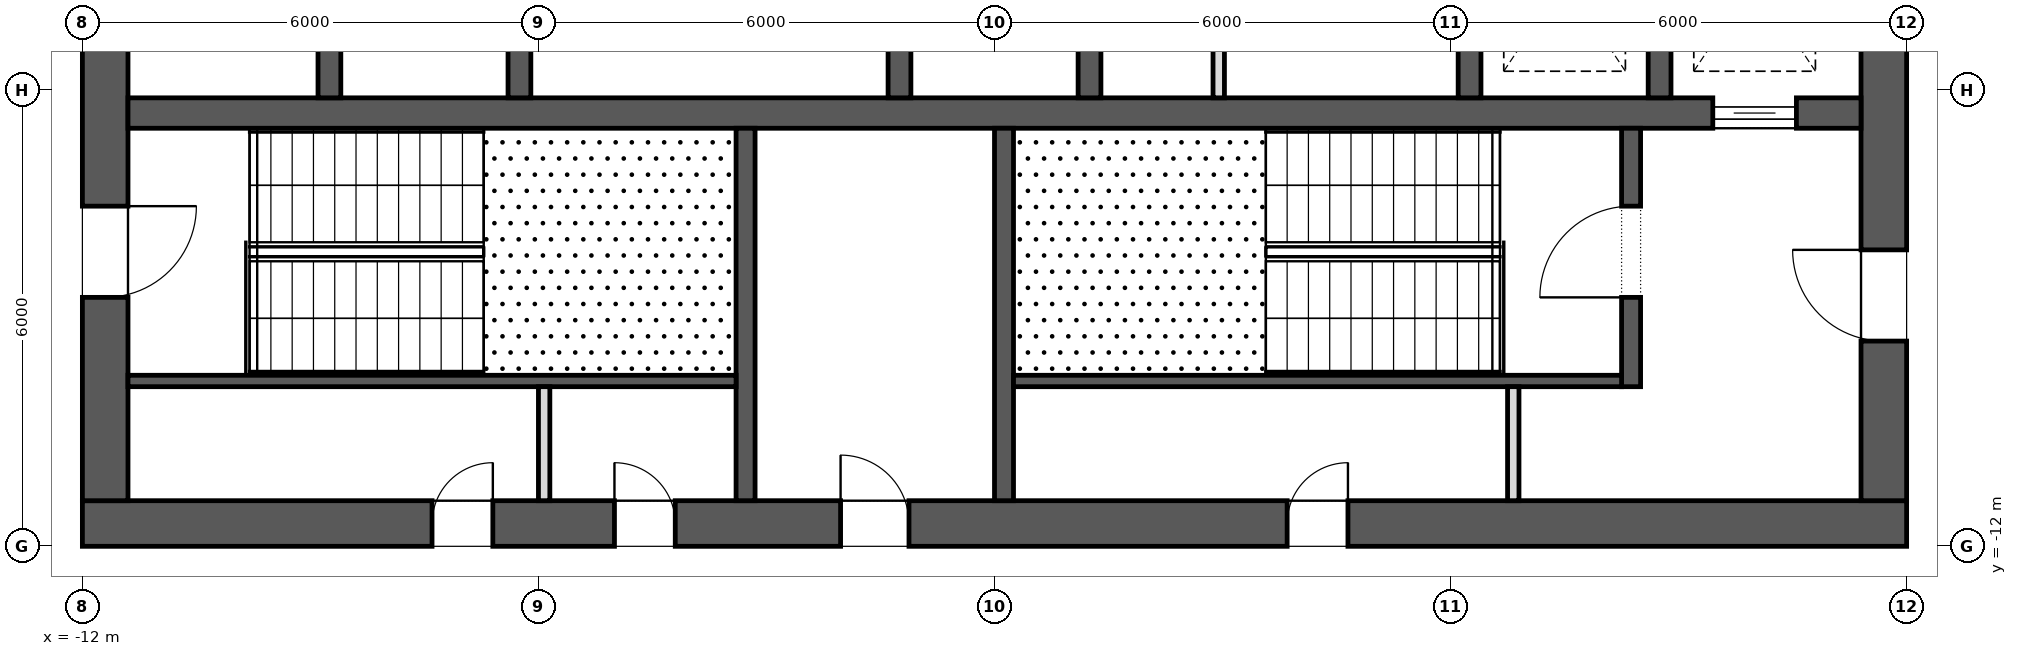
"""IFC4 building model, lengths in metres.
Left out: names, types, materials, properties, quantities, classifications, styles, units other than length and angle.
Written with IfcOpenShell. Run it as: python <this file> out.ifc"""

import sys

from ifc_helpers import new_model, si_unit, direction, frame, frame_2d, origin, place, context, subcontext, project, spatial, rectangle, extrude, element, fill, save


model = new_model("IFC4")
c1 = context("Model", 3, precision=1e-05, world=origin(), true_north=direction((0.0, 1.0)))
c2 = subcontext(c1, "Body", "Model", "MODEL_VIEW")
j1 = project(units=[si_unit("LENGTHUNIT", "METRE"), si_unit("PLANEANGLEUNIT", "RADIAN")], contexts=[c1])
p1 = place(None, origin())
s1 = spatial("IfcSite", under=j1, at=p1, CompositionType="ELEMENT")
p2 = place(p1, origin())
s2 = spatial("IfcBuilding", under=s1, at=p2, CompositionType="ELEMENT")
p3 = place(p2, frame((0.0, 0.0, 276.3)))
s3 = spatial("IfcBuildingStorey", under=s2, at=p3, CompositionType="ELEMENT", Elevation=276.3)
p4 = place(p3, frame((-12.0, -11.7, 0.0), z_axis=(0.0, 0.0, 1.0), x_axis=(1.0, 0.0, 0.0)))
e1 = element("IfcWall", 1, at=p4, inside=s3, PredefinedType="SHEAR", context=c2, shape_type="SweptSolid", body=[
    extrude(rectangle(XDim=24.0, YDim=0.6, at=frame_2d((12.0, 0.0))), origin(), (0.0, 0.0, 1.0), 4.0),
])
p5 = place(p4, frame((9.975, 0.0, 0.0)))
e2 = element("IfcOpeningElement", 2, at=p5, cuts=e1, PredefinedType="OPENING", context=c2, shape_type="SweptSolid", body=[
    extrude(rectangle(XDim=0.9, YDim=2.1, at=frame_2d((0.45, 1.05))), frame((0.0, 0.312, 0.0), z_axis=(0.0, -1.0, 0.0), x_axis=(1.0, 0.0, 0.0)), (0.0, 0.0, 1.0), 0.624),
])
p6 = place(p4, frame((4.6, 0.0, 0.0)))
e3 = element("IfcOpeningElement", 3, at=p6, cuts=e1, PredefinedType="OPENING", context=c2, shape_type="SweptSolid", body=[
    extrude(rectangle(XDim=0.8, YDim=2.1, at=frame_2d((0.4, 1.05))), frame((0.0, 0.312, 0.0), z_axis=(0.0, -1.0, 0.0), x_axis=(1.0, 0.0, 0.0)), (0.0, 0.0, 1.0), 0.624),
])
p7 = place(p4, frame((7.0, 0.0, 0.0)))
e4 = element("IfcOpeningElement", 4, at=p7, cuts=e1, PredefinedType="OPENING", context=c2, shape_type="SweptSolid", body=[
    extrude(rectangle(XDim=0.8, YDim=2.1, at=frame_2d((0.4, 1.05))), frame((0.0, 0.312, 0.0), z_axis=(0.0, -1.0, 0.0), x_axis=(1.0, 0.0, 0.0)), (0.0, 0.0, 1.0), 0.624),
])
p8 = place(p4, frame((15.85, 0.0, 0.0)))
e5 = element("IfcOpeningElement", 5, at=p8, cuts=e1, PredefinedType="OPENING", context=c2, shape_type="SweptSolid", body=[
    extrude(rectangle(XDim=0.8, YDim=2.1, at=frame_2d((0.4, 1.05))), frame((0.0, 0.312, 0.0), z_axis=(0.0, -1.0, 0.0), x_axis=(1.0, 0.0, 0.0)), (0.0, 0.0, 1.0), 0.624),
])
p9 = place(p3, frame((11.7, -11.4, 0.0), z_axis=(0.0, 0.0, 1.0), x_axis=(0.0, 1.0, 0.0)))
e6 = element("IfcWall", 6, at=p9, inside=s3, PredefinedType="SHEAR", context=c2, shape_type="SweptSolid", body=[
    extrude(rectangle(XDim=22.8, YDim=0.6, at=frame_2d((11.4, 0.0))), origin(), (0.0, 0.0, 1.0), 4.0),
])
p10 = place(p9, frame((10.2, 0.0, 0.0)))
e7 = element("IfcOpeningElement", 7, at=p10, cuts=e6, PredefinedType="OPENING", context=c2, shape_type="SweptSolid", body=[
    extrude(rectangle(XDim=2.4, YDim=2.1, at=frame_2d((1.2, 1.05))), frame((0.0, 0.312, 0.0), z_axis=(0.0, -1.0, 0.0), x_axis=(1.0, 0.0, 0.0)), (0.0, 0.0, 1.0), 0.624),
])
p11 = place(p9, frame((19.5, 0.0, 0.0)))
e8 = element("IfcOpeningElement", 8, at=p11, cuts=e6, PredefinedType="OPENING", context=c2, shape_type="SweptSolid", body=[
    extrude(rectangle(XDim=1.2, YDim=2.1, at=frame_2d((0.6, 1.05))), frame((0.0, 0.312, 0.0), z_axis=(0.0, -1.0, 0.0), x_axis=(1.0, 0.0, 0.0)), (0.0, 0.0, 1.0), 0.624),
])
p12 = place(p9, frame((2.1, 0.0, 0.0)))
e9 = element("IfcOpeningElement", 9, at=p12, cuts=e6, PredefinedType="OPENING", context=c2, shape_type="SweptSolid", body=[
    extrude(rectangle(XDim=1.2, YDim=2.1, at=frame_2d((0.6, 1.05))), frame((0.0, 0.312, 0.0), z_axis=(0.0, -1.0, 0.0), x_axis=(1.0, 0.0, 0.0)), (0.0, 0.0, 1.0), 0.624),
])
p13 = place(p3, frame((-11.7, -11.4, 0.0), z_axis=(0.0, 0.0, 1.0), x_axis=(0.0, 1.0, 0.0)))
e10 = element("IfcWall", 10, at=p13, inside=s3, PredefinedType="SHEAR", context=c2, shape_type="SweptSolid", body=[
    extrude(rectangle(XDim=22.8, YDim=0.6, at=frame_2d((11.4, 0.0))), origin(), (0.0, 0.0, 1.0), 4.0),
])
p14 = place(p13, frame((10.2, 0.0, 0.0)))
e11 = element("IfcOpeningElement", 11, at=p14, cuts=e10, PredefinedType="OPENING", context=c2, shape_type="SweptSolid", body=[
    extrude(rectangle(XDim=2.4, YDim=2.1, at=frame_2d((1.2, 1.05))), frame((0.0, 0.312, 0.0), z_axis=(0.0, -1.0, 0.0), x_axis=(1.0, 0.0, 0.0)), (0.0, 0.0, 1.0), 0.624),
])
p15 = place(p13, frame((18.925, 0.0, 0.0)))
e12 = element("IfcOpeningElement", 12, at=p15, cuts=e10, PredefinedType="OPENING", context=c2, shape_type="SweptSolid", body=[
    extrude(rectangle(XDim=1.2, YDim=2.1, at=frame_2d((0.6, 1.05))), frame((0.0, 0.312, 0.0), z_axis=(0.0, -1.0, 0.0), x_axis=(1.0, 0.0, 0.0)), (0.0, 0.0, 1.0), 0.624),
])
p16 = place(p13, frame((2.675, 0.0, 0.0)))
e13 = element("IfcOpeningElement", 13, at=p16, cuts=e10, PredefinedType="OPENING", context=c2, shape_type="SweptSolid", body=[
    extrude(rectangle(XDim=1.2, YDim=2.1, at=frame_2d((0.6, 1.05))), frame((0.0, 0.312, 0.0), z_axis=(0.0, -1.0, 0.0), x_axis=(1.0, 0.0, 0.0)), (0.0, 0.0, 1.0), 0.624),
])
p17 = place(p3, frame((-11.4, -6.3, 0.0), z_axis=(0.0, 0.0, 1.0), x_axis=(1.0, 0.0, 0.0)))
e14 = element("IfcWall", 14, at=p17, inside=s3, PredefinedType="SHEAR", context=c2, shape_type="SweptSolid", body=[
    extrude(rectangle(XDim=22.8, YDim=0.4, at=frame_2d((11.4, 0.0))), origin(), (0.0, 0.0, 1.0), 4.0),
])
p18 = place(p17, frame((20.85, 0.0, 0.0)))
e15 = element("IfcOpeningElement", 15, at=p18, cuts=e14, PredefinedType="OPENING", context=c2, shape_type="SweptSolid", body=[
    extrude(rectangle(XDim=1.1, YDim=2.1, at=frame_2d((0.55, 1.05))), frame((0.0, 0.212, 0.0), z_axis=(0.0, -1.0, 0.0), x_axis=(1.0, 0.0, 0.0)), (0.0, 0.0, 1.0), 0.424),
])
for number, where, z_axis, x_axis in (
    (16, (-8.75, -6.1, 0.0), (0.0, 0.0, 1.0), (0.0, 1.0, 0.0)),
    (17, (-6.25, -6.1, 0.0), (0.0, 0.0, 1.0), (0.0, 1.0, 0.0)),
    (18, (-1.25, -6.1, 0.0), (0.0, 0.0, 1.0), (0.0, 1.0, 0.0)),
    (19, (1.25, -6.1, 0.0), (0.0, 0.0, 1.0), (0.0, 1.0, 0.0)),
    (20, (6.25, -6.1, 0.0), (0.0, 0.0, 1.0), (0.0, 1.0, 0.0)),
    (21, (8.75, -6.1, 0.0), (0.0, 0.0, 1.0), (0.0, 1.0, 0.0)),
):
    element("IfcWall", number, at=place(p3, frame(where, z_axis=z_axis, x_axis=x_axis)), inside=s3, PredefinedType="SHEAR", context=c2, shape_type="SweptSolid", body=[
        extrude(rectangle(XDim=2.9, YDim=0.3, at=frame_2d((1.45, 0.0))), origin(), (0.0, 0.0, 1.0), 4.0),
    ])
for number, where, z_axis, x_axis in (
    (22, (-3.275, -11.4, 0.0), (0.0, 0.0, 1.0), (0.0, 1.0, 0.0)),
    (23, (0.125, -11.4, 0.0), (0.0, 0.0, 1.0), (0.0, 1.0, 0.0)),
):
    element("IfcWall", number, at=place(p3, frame(where, z_axis=z_axis, x_axis=x_axis)), inside=s3, PredefinedType="SHEAR", context=c2, shape_type="SweptSolid", body=[
        extrude(rectangle(XDim=4.9, YDim=0.25, at=frame_2d((2.45, 0.0))), origin(), (0.0, 0.0, 1.0), 3.7),
    ])
p19 = place(p3, frame((8.375, -9.9, 0.0), z_axis=(0.0, 0.0, 1.0), x_axis=(0.0, 1.0, 0.0)))
e24 = element("IfcWall", 24, at=p19, inside=s3, PredefinedType="SHEAR", context=c2, shape_type="SweptSolid", body=[
    extrude(rectangle(XDim=3.4, YDim=0.25, at=frame_2d((1.7, 0.0))), origin(), (0.0, 0.0, 1.0), 3.7),
])
p20 = place(p19, frame((1.175, 0.0, 0.0)))
e25 = element("IfcOpeningElement", 25, at=p20, cuts=e24, PredefinedType="OPENING", context=c2, shape_type="SweptSolid", body=[
    extrude(rectangle(XDim=1.2, YDim=2.1, at=frame_2d((0.6, 1.05))), frame((0.0, 0.137, 0.0), z_axis=(0.0, -1.0, 0.0), x_axis=(1.0, 0.0, 0.0)), (0.0, 0.0, 1.0), 0.274),
])
for number, where, z_axis, x_axis in (
    (26, (-11.4, -9.825, 0.0), (0.0, 0.0, 1.0), (1.0, 0.0, 0.0)),
    (27, (0.25, -9.825, 0.0), (0.0, 0.0, 1.0), (1.0, 0.0, 0.0)),
):
    element("IfcWall", number, at=place(p3, frame(where, z_axis=z_axis, x_axis=x_axis)), inside=s3, PredefinedType="SHEAR", context=c2, shape_type="SweptSolid", body=[
        extrude(rectangle(XDim=8.0, YDim=0.15, at=frame_2d((4.0, 0.0))), origin(), (0.0, 0.0, 1.0), 3.7),
    ])
for number, where, z_axis, x_axis in (
    (28, (-5.925, -11.4, 0.0), (0.0, 0.0, 1.0), (0.0, 1.0, 0.0)),
    (29, (6.825, -11.4, 0.0), (0.0, 0.0, 1.0), (0.0, 1.0, 0.0)),
):
    element("IfcWall", number, at=place(p3, frame(where, z_axis=z_axis, x_axis=x_axis)), inside=s3, PredefinedType="PARTITIONING", context=c2, shape_type="SweptSolid", body=[
        extrude(rectangle(XDim=1.5, YDim=0.15, at=frame_2d((0.75, 0.0))), origin(), (0.0, 0.0, 1.0), 3.7),
    ])
p21 = place(p3, frame((2.95, -6.1, 0.0), z_axis=(0.0, 0.0, 1.0), x_axis=(0.0, 1.0, 0.0)))
e30 = element("IfcWall", 30, at=p21, inside=s3, PredefinedType="PARTITIONING", context=c2, shape_type="SweptSolid", body=[
    extrude(rectangle(XDim=2.9, YDim=0.15, at=frame_2d((1.45, 0.0))), origin(), (0.0, 0.0, 1.0), 3.7),
])
p22 = place(p18, origin())
e31 = element("IfcDoor", 31, at=p22, inside=s3, OperationType="SLIDING_TO_LEFT", PredefinedType="DOOR", context=c2, shape_type="SweptSolid", body=[
    extrude(rectangle(XDim=1.1, YDim=2.1, at=frame_2d((0.55, 1.05))), frame((0.0, 0.025, 0.0), z_axis=(0.0, -1.0, 0.0), x_axis=(1.0, 0.0, 0.0)), (0.0, 0.0, 1.0), 0.05),
])
fill(e15, e31)
p23 = place(p16, frame((1.2, 0.0, 0.0), z_axis=(0.0, 0.0, 1.0), x_axis=(-1.0, 0.0, 0.0)))
e32 = element("IfcDoor", 32, at=p23, inside=s3, OperationType="SINGLE_SWING_RIGHT", PredefinedType="DOOR", context=c2, shape_type="SweptSolid", body=[
    extrude(rectangle(XDim=1.2, YDim=2.1, at=frame_2d((0.6, 1.05))), frame((0.0, 0.025, 0.0), z_axis=(0.0, -1.0, 0.0), x_axis=(1.0, 0.0, 0.0)), (0.0, 0.0, 1.0), 0.05),
])
fill(e13, e32)
p24 = place(p20, origin())
e33 = element("IfcDoor", 33, at=p24, inside=s3, OperationType="SINGLE_SWING_RIGHT", PredefinedType="DOOR", context=c2, shape_type="SweptSolid", body=[
    extrude(rectangle(XDim=1.2, YDim=2.1, at=frame_2d((0.6, 1.05))), frame((0.0, 0.025, 0.0), z_axis=(0.0, -1.0, 0.0), x_axis=(1.0, 0.0, 0.0)), (0.0, 0.0, 1.0), 0.05),
])
fill(e25, e33)
p25 = place(p12, origin())
e34 = element("IfcDoor", 34, at=p25, inside=s3, OperationType="SINGLE_SWING_LEFT", PredefinedType="DOOR", context=c2, shape_type="SweptSolid", body=[
    extrude(rectangle(XDim=1.2, YDim=2.1, at=frame_2d((0.6, 1.05))), frame((0.0, 0.025, 0.0), z_axis=(0.0, -1.0, 0.0), x_axis=(1.0, 0.0, 0.0)), (0.0, 0.0, 1.0), 0.05),
])
fill(e9, e34)
p26 = place(p5, origin())
e35 = element("IfcDoor", 35, at=p26, inside=s3, OperationType="SINGLE_SWING_RIGHT", PredefinedType="DOOR", context=c2, shape_type="SweptSolid", body=[
    extrude(rectangle(XDim=0.9, YDim=2.1, at=frame_2d((0.45, 1.05))), frame((0.0, 0.025, 0.0), z_axis=(0.0, -1.0, 0.0), x_axis=(1.0, 0.0, 0.0)), (0.0, 0.0, 1.0), 0.05),
])
fill(e2, e35)
p27 = place(p6, origin())
e36 = element("IfcDoor", 36, at=p27, inside=s3, OperationType="SINGLE_SWING_LEFT", PredefinedType="DOOR", context=c2, shape_type="SweptSolid", body=[
    extrude(rectangle(XDim=0.8, YDim=2.1, at=frame_2d((0.4, 1.05))), frame((0.0, 0.025, 0.0), z_axis=(0.0, -1.0, 0.0), x_axis=(1.0, 0.0, 0.0)), (0.0, 0.0, 1.0), 0.05),
])
fill(e3, e36)
p28 = place(p7, origin())
e37 = element("IfcDoor", 37, at=p28, inside=s3, OperationType="SINGLE_SWING_RIGHT", PredefinedType="DOOR", context=c2, shape_type="SweptSolid", body=[
    extrude(rectangle(XDim=0.8, YDim=2.1, at=frame_2d((0.4, 1.05))), frame((0.0, 0.025, 0.0), z_axis=(0.0, -1.0, 0.0), x_axis=(1.0, 0.0, 0.0)), (0.0, 0.0, 1.0), 0.05),
])
fill(e4, e37)
p29 = place(p8, origin())
e38 = element("IfcDoor", 38, at=p29, inside=s3, OperationType="SINGLE_SWING_LEFT", PredefinedType="DOOR", context=c2, shape_type="SweptSolid", body=[
    extrude(rectangle(XDim=0.8, YDim=2.1, at=frame_2d((0.4, 1.05))), frame((0.0, 0.025, 0.0), z_axis=(0.0, -1.0, 0.0), x_axis=(1.0, 0.0, 0.0)), (0.0, 0.0, 1.0), 0.05),
])
fill(e5, e38)
save(model, sys.argv[1])
